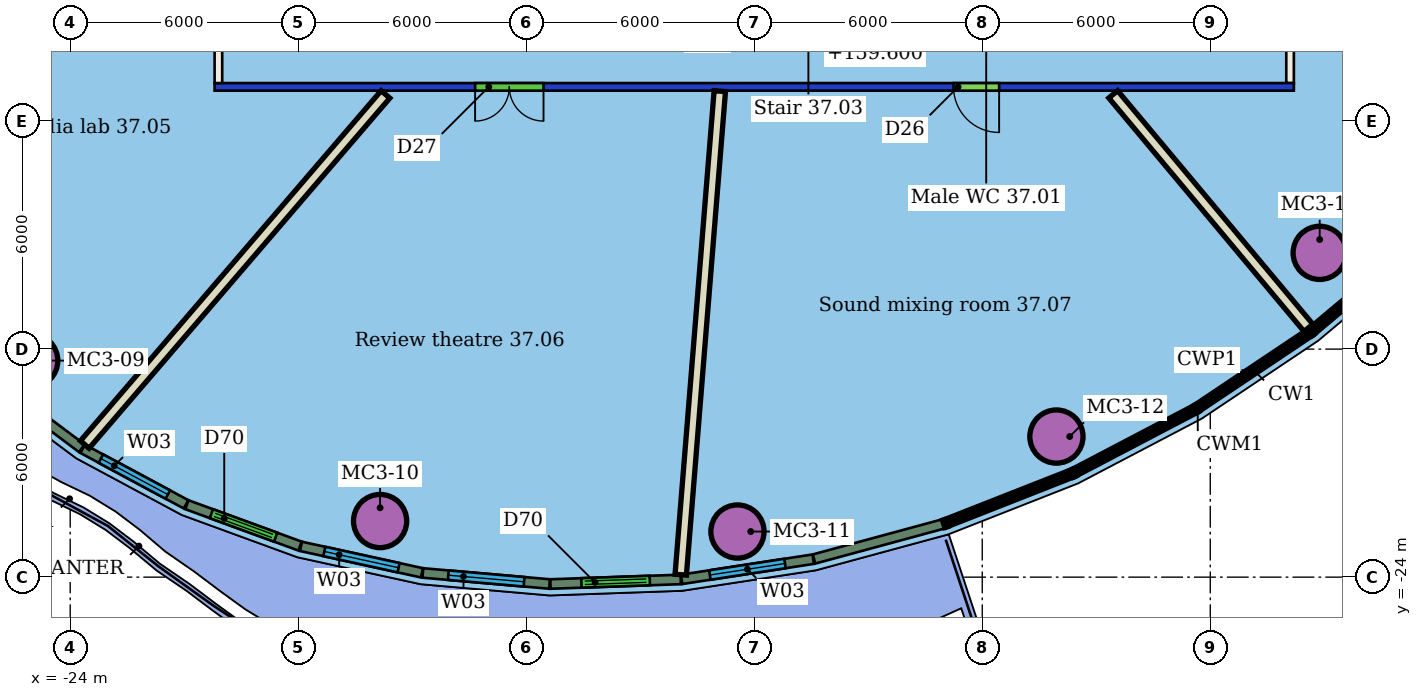
"""IFC4 building model, lengths in metres.
Left out: names, types, materials, properties, quantities, classifications, styles, units other than length and angle.
Written with IfcOpenShell. Run it as: python <this file> out.ifc"""

import sys

from ifc_helpers import new_model, si_unit, direction, frame, frame_2d, origin, origin_2d, place, context, subcontext, project, spatial, rectangle, hollow_circle, extrude, element, fill, save


model = new_model("IFC4")
c1 = context("Model", 3, precision=1e-05, world=origin(), true_north=direction((0.0, 1.0)))
c2 = subcontext(c1, "Body", "Model", "MODEL_VIEW")
j1 = project(units=[si_unit("LENGTHUNIT", "METRE"), si_unit("PLANEANGLEUNIT", "RADIAN")], contexts=[c1])
p1 = place(None, origin())
s1 = spatial("IfcSite", under=j1, at=p1, CompositionType="ELEMENT")
p2 = place(p1, origin())
s2 = spatial("IfcBuilding", under=s1, at=p2, CompositionType="ELEMENT")
p3 = place(p2, frame((0.0, 0.0, 157.8)))
s3 = spatial("IfcBuildingStorey", under=s2, at=p3, CompositionType="ELEMENT", Elevation=157.8)
for number, where, z_axis, x_axis in (
    (1, (-25.026, -18.303, 0.0), (0.0, 0.0, 1.0), (1.0, 0.0, 0.0)),
    (2, (-15.845, -22.524, 0.0), (0.0, 0.0, 1.0), (1.0, 0.0, 0.0)),
    (3, (-6.442, -22.8, 0.0), (0.0, 0.0, 1.0), (1.0, 0.0, 0.0)),
    (4, (1.952, -20.301, 0.0), (0.0, 0.0, 1.0), (1.0, 0.0, 0.0)),
    (5, (8.879, -15.467, 0.0), (0.0, 0.0, 1.0), (1.0, 0.0, 0.0)),
):
    element("IfcColumn", number, at=place(p3, frame(where, z_axis=z_axis, x_axis=x_axis)), inside=s3, PredefinedType="COLUMN", context=c2, shape_type="SweptSolid", body=[
        extrude(hollow_circle(Radius=0.7, WallThickness=0.05, at=origin_2d()), origin(), (0.0, 0.0, 1.0), 3.45),
    ])
p4 = place(p3, frame((8.2, -11.1, 0.0), z_axis=(0.0, 0.0, 1.0), x_axis=(-1.0, 0.0, 0.0)))
e6 = element("IfcWall", 6, at=p4, inside=s3, PredefinedType="PARTITIONING", context=c2, shape_type="SweptSolid", body=[
    extrude(rectangle(XDim=28.4, YDim=0.2, at=frame_2d((14.2, 0.0))), origin(), (0.0, 0.0, 1.0), 3.05),
])
p5 = place(p4, frame((19.745, 0.0, 0.0)))
e7 = element("IfcOpeningElement", 7, at=p5, cuts=e6, PredefinedType="OPENING", context=c2, shape_type="SweptSolid", body=[
    extrude(rectangle(XDim=1.8, YDim=2.4, at=frame_2d((0.9, 1.2))), frame((0.0, 0.11, 0.0), z_axis=(0.0, -1.0, 0.0), x_axis=(1.0, 0.0, 0.0)), (0.0, 0.0, 1.0), 0.22),
])
p6 = place(p4, frame((7.756, 0.0, 0.0)))
e8 = element("IfcOpeningElement", 8, at=p6, cuts=e6, PredefinedType="OPENING", context=c2, shape_type="SweptSolid", body=[
    extrude(rectangle(XDim=1.2, YDim=2.1, at=frame_2d((0.6, 1.05))), frame((0.0, 0.11, 0.0), z_axis=(0.0, -1.0, 0.0), x_axis=(1.0, 0.0, 0.0)), (0.0, 0.0, 1.0), 0.22),
])
p7 = place(p3, frame((-20.1, -11.0, 0.0), z_axis=(0.0, 0.0, 1.0), x_axis=(0.0, 1.0, 0.0)))
e9 = element("IfcWall", 9, at=p7, inside=s3, PredefinedType="PARTITIONING", context=c2, shape_type="SweptSolid", body=[
    extrude(rectangle(XDim=22.0, YDim=0.2, at=frame_2d((11.0, 0.0))), origin(), (0.0, 0.0, 1.0), 3.45),
])
p8 = place(p7, frame((8.568, 0.0, 0.0)))
e10 = element("IfcOpeningElement", 10, at=p8, cuts=e9, PredefinedType="OPENING", context=c2, shape_type="SweptSolid", body=[
    extrude(rectangle(XDim=1.8, YDim=2.1, at=frame_2d((0.9, 1.05))), frame((0.0, 0.11, 0.0), z_axis=(0.0, -1.0, 0.0), x_axis=(1.0, 0.0, 0.0)), (0.0, 0.0, 1.0), 0.22),
])
p9 = place(p7, frame((3.429, 0.0, 0.0)))
e11 = element("IfcOpeningElement", 11, at=p9, cuts=e9, PredefinedType="OPENING", context=c2, shape_type="SweptSolid", body=[
    extrude(rectangle(XDim=1.0, YDim=2.1, at=frame_2d((0.5, 1.05))), frame((0.0, 0.11, 0.0), z_axis=(0.0, -1.0, 0.0), x_axis=(1.0, 0.0, 0.0)), (0.0, 0.0, 1.0), 0.22),
])
p10 = place(p3, frame((8.1, 11.0, 0.0), z_axis=(0.0, 0.0, 1.0), x_axis=(0.0, -1.0, 0.0)))
e12 = element("IfcWall", 12, at=p10, inside=s3, PredefinedType="PARTITIONING", context=c2, shape_type="SweptSolid", body=[
    extrude(rectangle(XDim=22.0, YDim=0.2, at=frame_2d((11.0, 0.0))), origin(), (0.0, 0.0, 1.0), 3.45),
])
p11 = place(p10, frame((13.053, 0.0, 0.0)))
e13 = element("IfcOpeningElement", 13, at=p11, cuts=e12, PredefinedType="OPENING", context=c2, shape_type="SweptSolid", body=[
    extrude(rectangle(XDim=1.8, YDim=2.1, at=frame_2d((0.9, 1.05))), frame((0.0, 0.11, 0.0), z_axis=(0.0, -1.0, 0.0), x_axis=(1.0, 0.0, 0.0)), (0.0, 0.0, 1.0), 0.22),
])
p12 = place(p10, frame((5.243, 0.0, 0.0)))
e14 = element("IfcOpeningElement", 14, at=p12, cuts=e12, PredefinedType="OPENING", context=c2, shape_type="SweptSolid", body=[
    extrude(rectangle(XDim=1.8, YDim=2.1, at=frame_2d((0.9, 1.05))), frame((0.0, 0.11, 0.0), z_axis=(0.0, -1.0, 0.0), x_axis=(1.0, 0.0, 0.0)), (0.0, 0.0, 1.0), 0.22),
])
p13 = place(p3, frame((-23.616, -20.511, 0.0), z_axis=(0.0, 0.0, 1.0), x_axis=(0.65154594092, 0.758609179268, 0.0)))
e15 = element("IfcWall", 15, at=p13, inside=s3, PredefinedType="PARTITIONING", context=c2, shape_type="SweptSolid", body=[
    extrude(rectangle(XDim=12.145, YDim=0.3, at=frame_2d((6.073, 0.0))), origin(), (0.0, 0.0, 1.0), 3.45),
])
p14 = place(p3, frame((-7.934, -23.936, 0.0), z_axis=(0.0, 0.0, 1.0), x_axis=(0.080539579648, 0.996751411391, 0.0)))
e16 = element("IfcWall", 16, at=p14, inside=s3, PredefinedType="PARTITIONING", context=c2, shape_type="SweptSolid", body=[
    extrude(rectangle(XDim=12.765, YDim=0.3, at=frame_2d((6.382, 0.0))), origin(), (0.0, 0.0, 1.0), 3.45),
])
p15 = place(p3, frame((8.583, -17.44, 0.0), z_axis=(0.0, 0.0, 1.0), x_axis=(-0.641481818131, 0.767138238525, 0.0)))
e17 = element("IfcWall", 17, at=p15, inside=s3, PredefinedType="PARTITIONING", context=c2, shape_type="SweptSolid", body=[
    extrude(rectangle(XDim=8.009, YDim=0.3, at=frame_2d((4.004, 0.0))), origin(), (0.0, 0.0, 1.0), 3.45),
])
p16 = place(p3, frame((-26.08, -18.826, 0.0), z_axis=(0.0, 0.0, 1.0), x_axis=(0.800953148143, -0.598727028353, 0.0)))
e18 = element("IfcWall", 18, at=p16, inside=s3, PredefinedType="SOLIDWALL", context=c2, shape_type="SweptSolid", body=[
    extrude(rectangle(XDim=2.978, YDim=0.25, at=frame_2d((1.489, 0.0))), origin(), (0.0, 0.0, 1.0), 3.1),
])
p17 = place(p3, frame((-23.672, -20.623, 0.0), z_axis=(0.0, 0.0, 1.0), x_axis=(0.880950483719, -0.473208458541, 0.0)))
e19 = element("IfcWall", 19, at=p17, inside=s3, PredefinedType="SOLIDWALL", context=c2, shape_type="SweptSolid", body=[
    extrude(rectangle(XDim=3.088, YDim=0.25, at=frame_2d((1.544, 0.0))), origin(), (0.0, 0.0, 1.0), 3.1),
])
p18 = place(p17, frame((0.544, 0.0, 0.9)))
e20 = element("IfcOpeningElement", 20, at=p18, cuts=e19, PredefinedType="OPENING", context=c2, shape_type="SweptSolid", body=[
    extrude(rectangle(XDim=2.0, YDim=2.1, at=frame_2d((1.0, 1.05))), frame((0.0, 0.135, 0.0), z_axis=(0.0, -1.0, 0.0), x_axis=(1.0, 0.0, 0.0)), (0.0, 0.0, 1.0), 0.27),
])
p19 = place(p3, frame((-20.928, -22.095, 0.0), z_axis=(0.0, 0.0, 1.0), x_axis=(0.93919375703, -0.343387662498, 0.0)))
e21 = element("IfcWall", 21, at=p19, inside=s3, PredefinedType="SOLIDWALL", context=c2, shape_type="SweptSolid", body=[
    extrude(rectangle(XDim=3.169, YDim=0.25, at=frame_2d((1.585, 0.0))), origin(), (0.0, 0.0, 1.0), 3.1),
])
p20 = place(p19, frame((0.685, 0.0, 0.0)))
e22 = element("IfcOpeningElement", 22, at=p20, cuts=e21, PredefinedType="OPENING", context=c2, shape_type="SweptSolid", body=[
    extrude(rectangle(XDim=1.8, YDim=2.4, at=frame_2d((0.9, 1.2))), frame((0.0, 0.135, 0.0), z_axis=(0.0, -1.0, 0.0), x_axis=(1.0, 0.0, 0.0)), (0.0, 0.0, 1.0), 0.27),
])
p21 = place(p3, frame((-17.927, -23.19, 0.0), z_axis=(0.0, 0.0, 1.0), x_axis=(0.976913214514, -0.213636540199, 0.0)))
e23 = element("IfcWall", 23, at=p21, inside=s3, PredefinedType="SOLIDWALL", context=c2, shape_type="SweptSolid", body=[
    extrude(rectangle(XDim=3.258, YDim=0.25, at=frame_2d((1.629, 0.0))), origin(), (0.0, 0.0, 1.0), 3.1),
])
p22 = place(p21, frame((0.629, 0.0, 0.9)))
e24 = element("IfcOpeningElement", 24, at=p22, cuts=e23, PredefinedType="OPENING", context=c2, shape_type="SweptSolid", body=[
    extrude(rectangle(XDim=2.0, YDim=2.1, at=frame_2d((1.0, 1.05))), frame((0.0, 0.135, 0.0), z_axis=(0.0, -1.0, 0.0), x_axis=(1.0, 0.0, 0.0)), (0.0, 0.0, 1.0), 0.27),
])
p23 = place(p3, frame((-14.721, -23.89, 0.0), z_axis=(0.0, 0.0, 1.0), x_axis=(0.996225793942, -0.086799582281, 0.0)))
e25 = element("IfcWall", 25, at=p23, inside=s3, PredefinedType="SOLIDWALL", context=c2, shape_type="SweptSolid", body=[
    extrude(rectangle(XDim=3.347, YDim=0.25, at=frame_2d((1.674, 0.0))), origin(), (0.0, 0.0, 1.0), 3.1),
])
p24 = place(p23, frame((0.674, 0.0, 0.9)))
e26 = element("IfcOpeningElement", 26, at=p24, cuts=e25, PredefinedType="OPENING", context=c2, shape_type="SweptSolid", body=[
    extrude(rectangle(XDim=2.0, YDim=2.1, at=frame_2d((1.0, 1.05))), frame((0.0, 0.135, 0.0), z_axis=(0.0, -1.0, 0.0), x_axis=(1.0, 0.0, 0.0)), (0.0, 0.0, 1.0), 0.27),
])
p25 = place(p3, frame((-11.363, -24.181, 0.0), z_axis=(0.0, 0.0, 1.0), x_axis=(0.9993794249, 0.035224495537, 0.0)))
e27 = element("IfcWall", 27, at=p25, inside=s3, PredefinedType="SOLIDWALL", context=c2, shape_type="SweptSolid", body=[
    extrude(rectangle(XDim=3.431, YDim=0.25, at=frame_2d((1.715, 0.0))), origin(), (0.0, 0.0, 1.0), 3.1),
])
p26 = place(p25, frame((0.816, 0.0, 0.0)))
e28 = element("IfcOpeningElement", 28, at=p26, cuts=e27, PredefinedType="OPENING", context=c2, shape_type="SweptSolid", body=[
    extrude(rectangle(XDim=1.8, YDim=2.4, at=frame_2d((0.9, 1.2))), frame((0.0, 0.135, 0.0), z_axis=(0.0, -1.0, 0.0), x_axis=(1.0, 0.0, 0.0)), (0.0, 0.0, 1.0), 0.27),
])
p27 = place(p3, frame((-7.911, -24.058, 0.0), z_axis=(0.0, 0.0, 1.0), x_axis=(0.98845290294, 0.151528408789, 0.0)))
e29 = element("IfcWall", 29, at=p27, inside=s3, PredefinedType="SOLIDWALL", context=c2, shape_type="SweptSolid", body=[
    extrude(rectangle(XDim=3.504, YDim=0.25, at=frame_2d((1.752, 0.0))), origin(), (0.0, 0.0, 1.0), 3.1),
])
p28 = place(p27, frame((0.752, 0.0, 0.9)))
e30 = element("IfcOpeningElement", 30, at=p28, cuts=e29, PredefinedType="OPENING", context=c2, shape_type="SweptSolid", body=[
    extrude(rectangle(XDim=2.0, YDim=2.1, at=frame_2d((1.0, 1.05))), frame((0.0, 0.135, 0.0), z_axis=(0.0, -1.0, 0.0), x_axis=(1.0, 0.0, 0.0)), (0.0, 0.0, 1.0), 0.27),
])
p29 = place(p3, frame((-4.426, -23.522, 0.0), z_axis=(0.0, 0.0, 1.0), x_axis=(0.965135872227, 0.261749399505, 0.0)))
e31 = element("IfcWall", 31, at=p29, inside=s3, PredefinedType="SOLIDWALL", context=c2, shape_type="SweptSolid", body=[
    extrude(rectangle(XDim=3.519, YDim=0.25, at=frame_2d((1.76, 0.0))), origin(), (0.0, 0.0, 1.0), 3.1),
])
p30 = place(p5, origin())
e32 = element("IfcDoor", 32, at=p30, inside=s3, OperationType="DOUBLE_DOOR_SINGLE_SWING", PredefinedType="DOOR", context=c2, shape_type="SweptSolid", body=[
    extrude(rectangle(XDim=1.8, YDim=2.4, at=frame_2d((0.9, 1.2))), frame((0.0, 0.025, 0.0), z_axis=(0.0, -1.0, 0.0), x_axis=(1.0, 0.0, 0.0)), (0.0, 0.0, 1.0), 0.05),
])
fill(e7, e32)
p31 = place(p6, origin())
e33 = element("IfcDoor", 33, at=p31, inside=s3, OperationType="SINGLE_SWING_LEFT", PredefinedType="DOOR", context=c2, shape_type="SweptSolid", body=[
    extrude(rectangle(XDim=1.2, YDim=2.1, at=frame_2d((0.6, 1.05))), frame((0.0, 0.025, 0.0), z_axis=(0.0, -1.0, 0.0), x_axis=(1.0, 0.0, 0.0)), (0.0, 0.0, 1.0), 0.05),
])
fill(e8, e33)
p32 = place(p18, origin())
e34 = element("IfcWindow", 34, at=p32, inside=s3, PartitioningType="SINGLE_PANEL", PredefinedType="WINDOW", context=c2, shape_type="SweptSolid", body=[
    extrude(rectangle(XDim=2.0, YDim=2.1, at=frame_2d((1.0, 1.05))), frame((0.0, 0.03, 0.0), z_axis=(0.0, -1.0, 0.0), x_axis=(1.0, 0.0, 0.0)), (0.0, 0.0, 1.0), 0.06),
])
fill(e20, e34)
p33 = place(p20, origin())
e35 = element("IfcDoor", 35, at=p33, inside=s3, OperationType="DOUBLE_DOOR_SLIDING", PredefinedType="DOOR", context=c2, shape_type="SweptSolid", body=[
    extrude(rectangle(XDim=1.8, YDim=2.4, at=frame_2d((0.9, 1.2))), frame((0.0, 0.025, 0.0), z_axis=(0.0, -1.0, 0.0), x_axis=(1.0, 0.0, 0.0)), (0.0, 0.0, 1.0), 0.05),
])
fill(e22, e35)
p34 = place(p22, origin())
e36 = element("IfcWindow", 36, at=p34, inside=s3, PartitioningType="SINGLE_PANEL", PredefinedType="WINDOW", context=c2, shape_type="SweptSolid", body=[
    extrude(rectangle(XDim=2.0, YDim=2.1, at=frame_2d((1.0, 1.05))), frame((0.0, 0.03, 0.0), z_axis=(0.0, -1.0, 0.0), x_axis=(1.0, 0.0, 0.0)), (0.0, 0.0, 1.0), 0.06),
])
fill(e24, e36)
p35 = place(p24, origin())
e37 = element("IfcWindow", 37, at=p35, inside=s3, PartitioningType="SINGLE_PANEL", PredefinedType="WINDOW", context=c2, shape_type="SweptSolid", body=[
    extrude(rectangle(XDim=2.0, YDim=2.1, at=frame_2d((1.0, 1.05))), frame((0.0, 0.03, 0.0), z_axis=(0.0, -1.0, 0.0), x_axis=(1.0, 0.0, 0.0)), (0.0, 0.0, 1.0), 0.06),
])
fill(e26, e37)
p36 = place(p26, origin())
e38 = element("IfcDoor", 38, at=p36, inside=s3, OperationType="DOUBLE_DOOR_SLIDING", PredefinedType="DOOR", context=c2, shape_type="SweptSolid", body=[
    extrude(rectangle(XDim=1.8, YDim=2.4, at=frame_2d((0.9, 1.2))), frame((0.0, 0.025, 0.0), z_axis=(0.0, -1.0, 0.0), x_axis=(1.0, 0.0, 0.0)), (0.0, 0.0, 1.0), 0.05),
])
fill(e28, e38)
p37 = place(p28, origin())
e39 = element("IfcWindow", 39, at=p37, inside=s3, PartitioningType="SINGLE_PANEL", PredefinedType="WINDOW", context=c2, shape_type="SweptSolid", body=[
    extrude(rectangle(XDim=2.0, YDim=2.1, at=frame_2d((1.0, 1.05))), frame((0.0, 0.03, 0.0), z_axis=(0.0, -1.0, 0.0), x_axis=(1.0, 0.0, 0.0)), (0.0, 0.0, 1.0), 0.06),
])
fill(e30, e39)
save(model, sys.argv[1])
